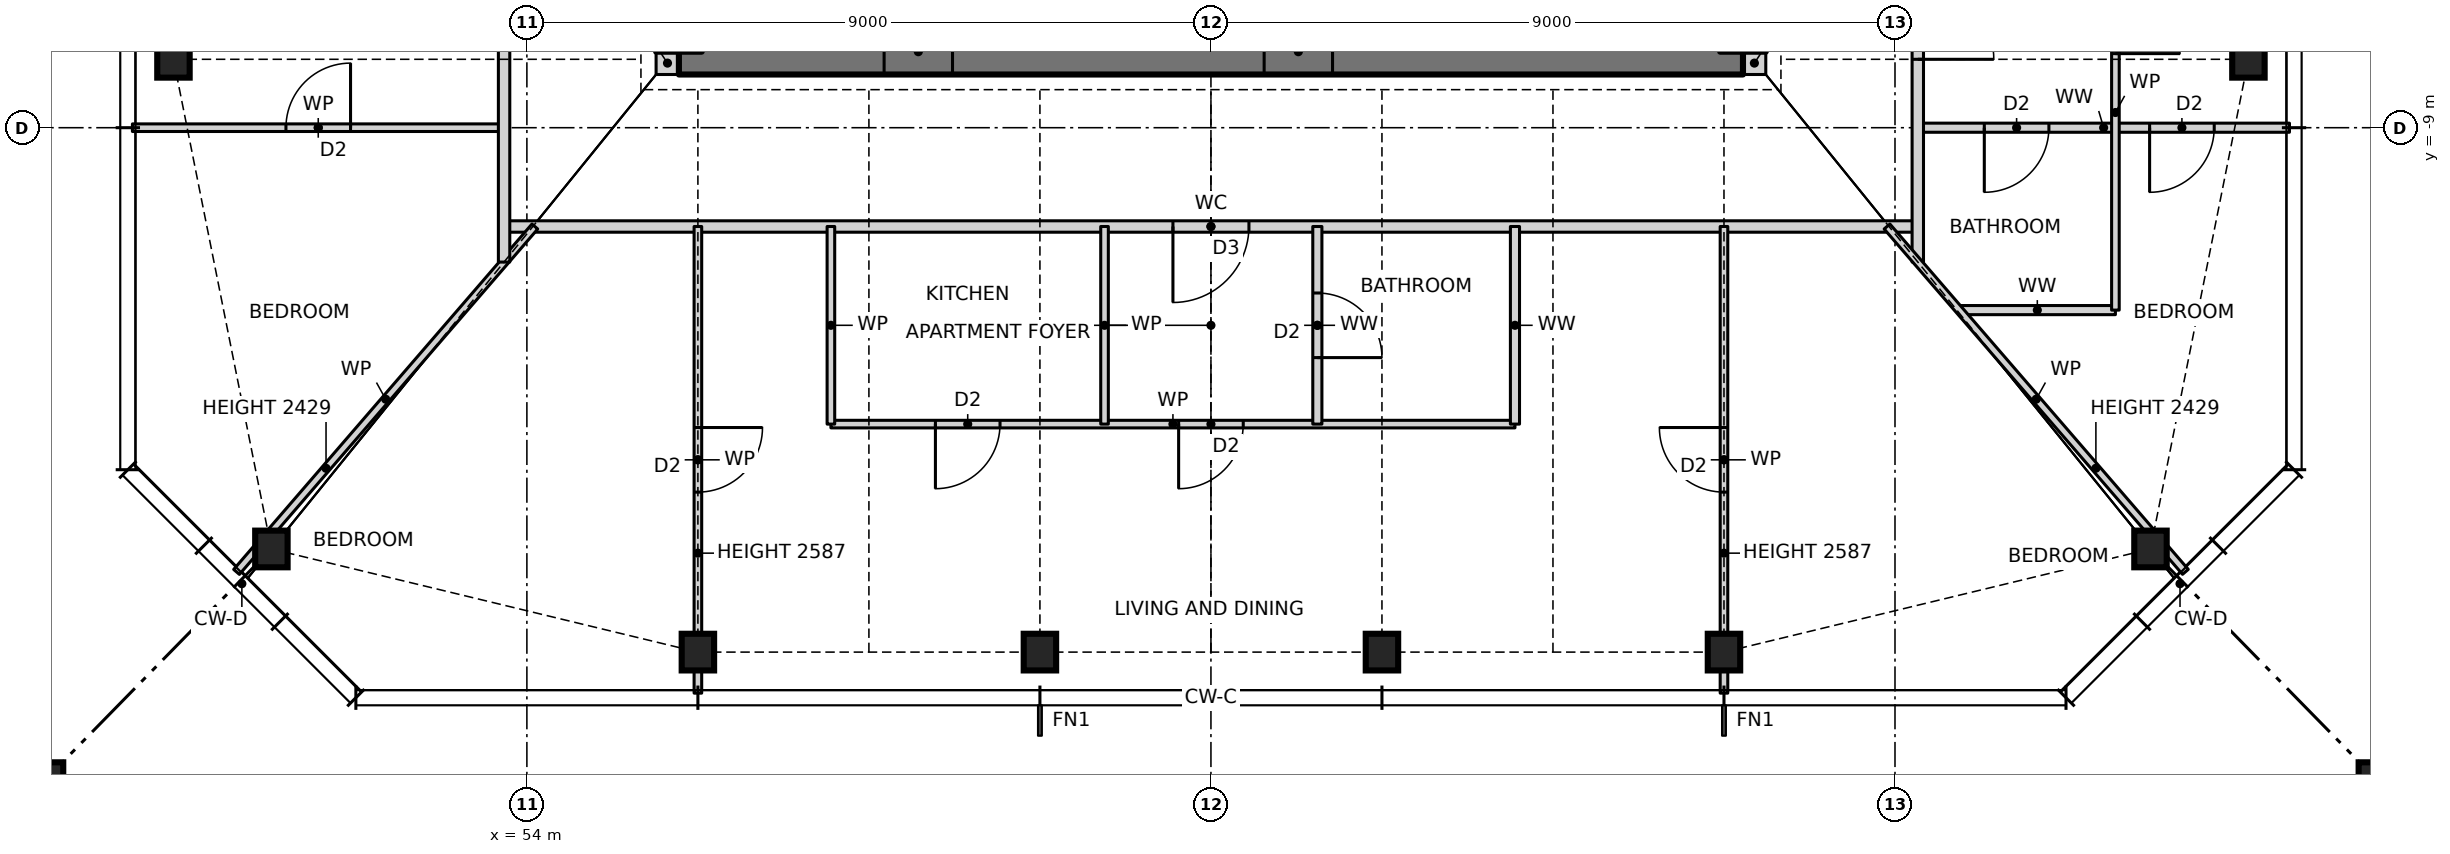
"""IFC4 building model, lengths in metres.
Left out: names, types, materials, properties, quantities, classifications, styles, units other than length and angle.
Written with IfcOpenShell. Run it as: python <this file> out.ifc"""

import sys

from ifc_helpers import new_model, si_unit, direction, frame, frame_2d, origin, origin_2d, place, context, subcontext, project, spatial, rectangle, hollow_rectangle, i_section, extrude, element, fill, save


model = new_model("IFC4")
c1 = context("Model", 3, precision=1e-05, world=origin(), true_north=direction((0.0, 1.0)))
c2 = subcontext(c1, "Body", "Model", "MODEL_VIEW")
j1 = project(units=[si_unit("LENGTHUNIT", "METRE"), si_unit("PLANEANGLEUNIT", "RADIAN")], contexts=[c1])
p1 = place(None, origin())
s1 = spatial("IfcSite", under=j1, at=p1, CompositionType="ELEMENT")
p2 = place(p1, origin())
s2 = spatial("IfcBuilding", under=s1, at=p2, CompositionType="ELEMENT")
p3 = place(p2, frame((0.0, 0.0, 91.0)))
s3 = spatial("IfcBuildingStorey", under=s2, at=p3, CompositionType="ELEMENT", Elevation=91.0)
for number, where, z_axis, x_axis in (
    (1, (50.639, -14.543, 0.0), (0.0, 0.0, 1.0), (1.0, 0.0, 0.0)),
    (2, (56.25, -15.9, 0.0), (0.0, 0.0, 1.0), (1.0, 0.0, 0.0)),
    (3, (60.75, -15.9, 0.0), (0.0, 0.0, 1.0), (1.0, 0.0, 0.0)),
    (4, (65.25, -15.9, 0.0), (0.0, 0.0, 1.0), (1.0, 0.0, 0.0)),
    (5, (69.75, -15.9, 0.0), (0.0, 0.0, 1.0), (1.0, 0.0, 0.0)),
    (6, (75.361, -14.543, 0.0), (0.0, 0.0, 1.0), (1.0, 0.0, 0.0)),
    (7, (76.65, -8.1, 0.0), (0.0, 0.0, 1.0), (1.0, 0.0, 0.0)),
    (8, (49.35, -8.1, 0.0), (0.0, 0.0, 1.0), (1.0, 0.0, 0.0)),
):
    element("IfcColumn", number, at=place(p3, frame(where, z_axis=z_axis, x_axis=x_axis)), inside=s3, PredefinedType="COLUMN", context=c2, shape_type="SweptSolid", body=[
        extrude(i_section(OverallWidth=0.427, OverallDepth=0.483, WebThickness=0.051, FlangeThickness=0.082, at=origin_2d()), origin(), (0.0, 0.0, 1.0), 3.5),
    ])
for number, where, z_axis, x_axis in (
    (9, (47.35, -17.9, 0.0), (0.0, 0.0, 1.0), (1.0, 0.0, 0.0)),
    (10, (78.65, -17.9, 0.0), (0.0, 0.0, 1.0), (1.0, 0.0, 0.0)),
):
    element("IfcColumn", number, at=place(p3, frame(where, z_axis=z_axis, x_axis=x_axis)), inside=s3, PredefinedType="COLUMN", context=c2, shape_type="SweptSolid", body=[
        extrude(hollow_rectangle(XDim=1.1, YDim=1.1, WallThickness=0.06, at=origin_2d()), origin(), (0.0, 0.0, 1.0), 3.5),
    ])
for number, where, z_axis, x_axis in (
    (11, (55.7, -8.15, 0.0), (0.0, 0.0, 1.0), (1.0, 0.0, 0.0)),
    (12, (70.0, -8.15, 0.0), (0.0, 0.0, 1.0), (1.0, 0.0, 0.0)),
):
    element("IfcWall", number, at=place(p3, frame(where, z_axis=z_axis, x_axis=x_axis)), inside=s3, PredefinedType="SOLIDWALL", context=c2, shape_type="SweptSolid", body=[
        extrude(rectangle(XDim=0.3, YDim=0.3, at=frame_2d((0.15, 0.0))), origin(), (0.0, 0.0, 1.0), 3.5),
    ])
p4 = place(p3, frame((56.0, -8.0, 0.0), z_axis=(0.0, 0.0, 1.0), x_axis=(1.0, 0.0, 0.0)))
e13 = element("IfcWall", 13, at=p4, inside=s3, PredefinedType="SHEAR", context=c2, shape_type="SweptSolid", body=[
    extrude(rectangle(XDim=14.0, YDim=0.6, at=frame_2d((7.0, 0.0))), origin(), (0.0, 0.0, 1.0), 3.5),
])
p5 = place(p4, frame((2.7, 0.0, 0.0)))
e14 = element("IfcOpeningElement", 14, at=p5, cuts=e13, PredefinedType="OPENING", context=c2, shape_type="SweptSolid", body=[
    extrude(rectangle(XDim=0.9, YDim=2.1, at=frame_2d((0.45, 1.05))), frame((0.0, 0.31, 0.0), z_axis=(0.0, -1.0, 0.0), x_axis=(1.0, 0.0, 0.0)), (0.0, 0.0, 1.0), 0.62),
])
p6 = place(p4, frame((7.7, 0.0, 0.0)))
e15 = element("IfcOpeningElement", 15, at=p6, cuts=e13, PredefinedType="OPENING", context=c2, shape_type="SweptSolid", body=[
    extrude(rectangle(XDim=0.9, YDim=2.1, at=frame_2d((0.45, 1.05))), frame((0.0, 0.31, 0.0), z_axis=(0.0, -1.0, 0.0), x_axis=(1.0, 0.0, 0.0)), (0.0, 0.0, 1.0), 0.62),
])
p7 = place(p3, frame((58.0, -12.9, 0.0), z_axis=(0.0, 0.0, 1.0), x_axis=(1.0, 0.0, 0.0)))
e16 = element("IfcWall", 16, at=p7, inside=s3, PredefinedType="PARTITIONING", context=c2, shape_type="SweptSolid", body=[
    extrude(rectangle(XDim=9.0, YDim=0.1, at=frame_2d((4.5, 0.0))), origin(), (0.0, 0.0, 1.0), 3.27),
])
p8 = place(p7, frame((1.375, 0.0, 0.0)))
e17 = element("IfcOpeningElement", 17, at=p8, cuts=e16, PredefinedType="OPENING", context=c2, shape_type="SweptSolid", body=[
    extrude(rectangle(XDim=0.85, YDim=2.1, at=frame_2d((0.425, 1.05))), frame((0.0, 0.06, 0.0), z_axis=(0.0, -1.0, 0.0), x_axis=(1.0, 0.0, 0.0)), (0.0, 0.0, 1.0), 0.12),
])
p9 = place(p7, frame((4.575, 0.0, 0.0)))
e18 = element("IfcOpeningElement", 18, at=p9, cuts=e16, PredefinedType="OPENING", context=c2, shape_type="SweptSolid", body=[
    extrude(rectangle(XDim=0.85, YDim=2.1, at=frame_2d((0.425, 1.05))), frame((0.0, 0.06, 0.0), z_axis=(0.0, -1.0, 0.0), x_axis=(1.0, 0.0, 0.0)), (0.0, 0.0, 1.0), 0.12),
])
p10 = place(p3, frame((72.845, -11.4, 0.0), z_axis=(0.0, 0.0, 1.0), x_axis=(1.0, 0.0, 0.0)))
e19 = element("IfcWall", 19, at=p10, inside=s3, PredefinedType="PARTITIONING", context=c2, shape_type="SweptSolid", body=[
    extrude(rectangle(XDim=2.055, YDim=0.12, at=frame_2d((1.027, 0.0))), origin(), (0.0, 0.0, 1.0), 3.27),
])
p11 = place(p3, frame((53.7, -10.3, 0.0), z_axis=(0.0, 0.0, 1.0), x_axis=(1.0, 0.0, 0.0)))
e20 = element("IfcWall", 20, at=p11, inside=s3, PredefinedType="PARTITIONING", context=c2, shape_type="SweptSolid", body=[
    extrude(rectangle(XDim=18.6, YDim=0.15, at=frame_2d((9.3, 0.0))), origin(), (0.0, 0.0, 1.0), 3.27),
])
p12 = place(p11, frame((8.8, 0.0, 0.0)))
e21 = element("IfcOpeningElement", 21, at=p12, cuts=e20, PredefinedType="OPENING", context=c2, shape_type="SweptSolid", body=[
    extrude(rectangle(XDim=1.0, YDim=2.1, at=frame_2d((0.5, 1.05))), frame((0.0, 0.085, 0.0), z_axis=(0.0, -1.0, 0.0), x_axis=(1.0, 0.0, 0.0)), (0.0, 0.0, 1.0), 0.17),
])
p13 = place(p3, frame((48.81, -9.0, 0.0), z_axis=(0.0, 0.0, 1.0), x_axis=(1.0, 0.0, 0.0)))
e22 = element("IfcWall", 22, at=p13, inside=s3, PredefinedType="PARTITIONING", context=c2, shape_type="SweptSolid", body=[
    extrude(rectangle(XDim=4.89, YDim=0.1, at=frame_2d((2.445, 0.0))), origin(), (0.0, 0.0, 1.0), 3.27),
])
p14 = place(p13, frame((2.02, 0.0, 0.0)))
e23 = element("IfcOpeningElement", 23, at=p14, cuts=e22, PredefinedType="OPENING", context=c2, shape_type="SweptSolid", body=[
    extrude(rectangle(XDim=0.85, YDim=2.1, at=frame_2d((0.425, 1.05))), frame((0.0, 0.06, 0.0), z_axis=(0.0, -1.0, 0.0), x_axis=(1.0, 0.0, 0.0)), (0.0, 0.0, 1.0), 0.12),
])
p15 = place(p3, frame((72.3, -9.0, 0.0), z_axis=(0.0, 0.0, 1.0), x_axis=(1.0, 0.0, 0.0)))
e24 = element("IfcWall", 24, at=p15, inside=s3, PredefinedType="PARTITIONING", context=c2, shape_type="SweptSolid", body=[
    extrude(rectangle(XDim=4.89, YDim=0.12, at=frame_2d((2.445, 0.0))), origin(), (0.0, 0.0, 1.0), 3.27),
])
p16 = place(p15, frame((0.875, 0.0, 0.0)))
e25 = element("IfcOpeningElement", 25, at=p16, cuts=e24, PredefinedType="OPENING", context=c2, shape_type="SweptSolid", body=[
    extrude(rectangle(XDim=0.85, YDim=2.1, at=frame_2d((0.425, 1.05))), frame((0.0, 0.07, 0.0), z_axis=(0.0, -1.0, 0.0), x_axis=(1.0, 0.0, 0.0)), (0.0, 0.0, 1.0), 0.14),
])
p17 = place(p15, frame((3.05, 0.0, 0.0)))
e26 = element("IfcOpeningElement", 26, at=p17, cuts=e24, PredefinedType="OPENING", context=c2, shape_type="SweptSolid", body=[
    extrude(rectangle(XDim=0.85, YDim=2.1, at=frame_2d((0.425, 1.05))), frame((0.0, 0.07, 0.0), z_axis=(0.0, -1.0, 0.0), x_axis=(1.0, 0.0, 0.0)), (0.0, 0.0, 1.0), 0.14),
])
p18 = place(p3, frame((50.18, -14.845, 0.0), z_axis=(0.0, 0.0, 1.0), x_axis=(0.653585997703, 0.756852260092, 0.0)))
e27 = element("IfcWall", 27, at=p18, inside=s3, PredefinedType="PARTITIONING", context=c2, shape_type="SweptSolid", body=[
    extrude(rectangle(XDim=6.005, YDim=0.1, at=frame_2d((3.002, 0.0))), origin(), (0.0, 0.0, 1.0), 2.429),
])
p19 = place(p3, frame((74.9, -11.4, 0.0), z_axis=(0.0, 0.0, 1.0), x_axis=(0.0, 1.0, 0.0)))
e28 = element("IfcWall", 28, at=p19, inside=s3, PredefinedType="PARTITIONING", context=c2, shape_type="SweptSolid", body=[
    extrude(rectangle(XDim=5.2, YDim=0.1, at=frame_2d((2.6, 0.0))), origin(), (0.0, 0.0, 1.0), 3.27),
])
p20 = place(p19, frame((3.375, 0.0, 0.0)))
e29 = element("IfcOpeningElement", 29, at=p20, cuts=e28, PredefinedType="OPENING", context=c2, shape_type="SweptSolid", body=[
    extrude(rectangle(XDim=0.85, YDim=2.1, at=frame_2d((0.425, 1.05))), frame((0.0, 0.06, 0.0), z_axis=(0.0, -1.0, 0.0), x_axis=(1.0, 0.0, 0.0)), (0.0, 0.0, 1.0), 0.12),
])
p21 = place(p3, frame((72.3, -10.768, 0.0), z_axis=(0.0, 0.0, 1.0), x_axis=(0.0, 1.0, 0.0)))
e30 = element("IfcWall", 30, at=p21, inside=s3, PredefinedType="PARTITIONING", context=c2, shape_type="SweptSolid", body=[
    extrude(rectangle(XDim=21.536, YDim=0.15, at=frame_2d((10.768, 0.0))), origin(), (0.0, 0.0, 1.0), 3.27),
])
p22 = place(p21, frame((2.668, 0.0, 0.0)))
e31 = element("IfcOpeningElement", 31, at=p22, cuts=e30, PredefinedType="OPENING", context=c2, shape_type="SweptSolid", body=[
    extrude(rectangle(XDim=1.0, YDim=2.1, at=frame_2d((0.5, 1.05))), frame((0.0, 0.085, 0.0), z_axis=(0.0, -1.0, 0.0), x_axis=(1.0, 0.0, 0.0)), (0.0, 0.0, 1.0), 0.17),
])
p23 = place(p21, frame((6.893, 0.0, 0.0)))
e32 = element("IfcOpeningElement", 32, at=p23, cuts=e30, PredefinedType="OPENING", context=c2, shape_type="SweptSolid", body=[
    extrude(rectangle(XDim=1.0, YDim=2.1, at=frame_2d((0.5, 1.05))), frame((0.0, 0.085, 0.0), z_axis=(0.0, -1.0, 0.0), x_axis=(1.0, 0.0, 0.0)), (0.0, 0.0, 1.0), 0.17),
])
p24 = place(p21, frame((16.168, 0.0, 0.0)))
e33 = element("IfcOpeningElement", 33, at=p24, cuts=e30, PredefinedType="OPENING", context=c2, shape_type="SweptSolid", body=[
    extrude(rectangle(XDim=1.0, YDim=2.1, at=frame_2d((0.5, 1.05))), frame((0.0, 0.085, 0.0), z_axis=(0.0, -1.0, 0.0), x_axis=(1.0, 0.0, 0.0)), (0.0, 0.0, 1.0), 0.17),
])
p25 = place(p3, frame((69.75, -16.44, 0.0), z_axis=(0.0, 0.0, 1.0), x_axis=(0.0, 1.0, 0.0)))
e34 = element("IfcWall", 34, at=p25, inside=s3, PredefinedType="PARTITIONING", context=c2, shape_type="SweptSolid", body=[
    extrude(rectangle(XDim=6.14, YDim=0.1, at=frame_2d((3.07, 0.0))), origin(), (0.0, 0.0, 1.0), 2.587),
])
p26 = place(p25, frame((2.645, 0.0, 0.0)))
e35 = element("IfcOpeningElement", 35, at=p26, cuts=e34, PredefinedType="OPENING", context=c2, shape_type="SweptSolid", body=[
    extrude(rectangle(XDim=0.85, YDim=2.1, at=frame_2d((0.425, 1.05))), frame((0.0, 0.06, 0.0), z_axis=(0.0, -1.0, 0.0), x_axis=(1.0, 0.0, 0.0)), (0.0, 0.0, 1.0), 0.12),
])
p27 = place(p3, frame((67.0, -12.9, 0.0), z_axis=(0.0, 0.0, 1.0), x_axis=(0.0, 1.0, 0.0)))
e36 = element("IfcWall", 36, at=p27, inside=s3, PredefinedType="PARTITIONING", context=c2, shape_type="SweptSolid", body=[
    extrude(rectangle(XDim=2.6, YDim=0.12, at=frame_2d((1.3, 0.0))), origin(), (0.0, 0.0, 1.0), 3.27),
])
p28 = place(p3, frame((64.4, -12.9, 0.0), z_axis=(0.0, 0.0, 1.0), x_axis=(0.0, 1.0, 0.0)))
e37 = element("IfcWall", 37, at=p28, inside=s3, PredefinedType="PARTITIONING", context=c2, shape_type="SweptSolid", body=[
    extrude(rectangle(XDim=2.6, YDim=0.12, at=frame_2d((1.3, 0.0))), origin(), (0.0, 0.0, 1.0), 3.27),
])
p29 = place(p28, frame((0.875, 0.0, 0.0)))
e38 = element("IfcOpeningElement", 38, at=p29, cuts=e37, PredefinedType="OPENING", context=c2, shape_type="SweptSolid", body=[
    extrude(rectangle(XDim=0.85, YDim=2.1, at=frame_2d((0.425, 1.05))), frame((0.0, 0.07, 0.0), z_axis=(0.0, -1.0, 0.0), x_axis=(1.0, 0.0, 0.0)), (0.0, 0.0, 1.0), 0.14),
])
for number, where, z_axis, x_axis in (
    (39, (61.6, -12.9, 0.0), (0.0, 0.0, 1.0), (0.0, 1.0, 0.0)),
    (40, (58.0, -12.9, 0.0), (0.0, 0.0, 1.0), (0.0, 1.0, 0.0)),
):
    element("IfcWall", number, at=place(p3, frame(where, z_axis=z_axis, x_axis=x_axis)), inside=s3, PredefinedType="PARTITIONING", context=c2, shape_type="SweptSolid", body=[
        extrude(rectangle(XDim=2.6, YDim=0.1, at=frame_2d((1.3, 0.0))), origin(), (0.0, 0.0, 1.0), 3.27),
    ])
p30 = place(p3, frame((56.25, -16.44, 0.0), z_axis=(0.0, 0.0, 1.0), x_axis=(0.0, 1.0, 0.0)))
e41 = element("IfcWall", 41, at=p30, inside=s3, PredefinedType="PARTITIONING", context=c2, shape_type="SweptSolid", body=[
    extrude(rectangle(XDim=6.14, YDim=0.1, at=frame_2d((3.07, 0.0))), origin(), (0.0, 0.0, 1.0), 2.587),
])
p31 = place(p30, frame((2.645, 0.0, 0.0)))
e42 = element("IfcOpeningElement", 42, at=p31, cuts=e41, PredefinedType="OPENING", context=c2, shape_type="SweptSolid", body=[
    extrude(rectangle(XDim=0.85, YDim=2.1, at=frame_2d((0.425, 1.05))), frame((0.0, 0.06, 0.0), z_axis=(0.0, -1.0, 0.0), x_axis=(1.0, 0.0, 0.0)), (0.0, 0.0, 1.0), 0.12),
])
p32 = place(p3, frame((53.7, -10.768, 0.0), z_axis=(0.0, 0.0, 1.0), x_axis=(0.0, 1.0, 0.0)))
e43 = element("IfcWall", 43, at=p32, inside=s3, PredefinedType="PARTITIONING", context=c2, shape_type="SweptSolid", body=[
    extrude(rectangle(XDim=21.536, YDim=0.15, at=frame_2d((10.768, 0.0))), origin(), (0.0, 0.0, 1.0), 3.27),
])
p33 = place(p32, frame((10.268, 0.0, 0.0)))
e44 = element("IfcOpeningElement", 44, at=p33, cuts=e43, PredefinedType="OPENING", context=c2, shape_type="SweptSolid", body=[
    extrude(rectangle(XDim=1.0, YDim=2.1, at=frame_2d((0.5, 1.05))), frame((0.0, 0.085, 0.0), z_axis=(0.0, -1.0, 0.0), x_axis=(1.0, 0.0, 0.0)), (0.0, 0.0, 1.0), 0.17),
])
p34 = place(p3, frame((75.821, -14.844, 0.0), z_axis=(0.0, 0.0, 1.0), x_axis=(-0.65378286253, 0.756682211144, 0.0)))
e45 = element("IfcWall", 45, at=p34, inside=s3, PredefinedType="PARTITIONING", context=c2, shape_type="SweptSolid", body=[
    extrude(rectangle(XDim=6.005, YDim=0.1, at=frame_2d((3.002, 0.0))), origin(), (0.0, 0.0, 1.0), 2.429),
])
p35 = place(p8, frame((0.85, 0.0, 0.0), z_axis=(0.0, 0.0, 1.0), x_axis=(-1.0, 0.0, 0.0)))
e46 = element("IfcDoor", 46, at=p35, inside=s3, OperationType="SINGLE_SWING_RIGHT", PredefinedType="DOOR", context=c2, shape_type="SweptSolid", body=[
    extrude(rectangle(XDim=0.85, YDim=2.1, at=frame_2d((0.425, 1.05))), frame((0.0, 0.025, 0.0), z_axis=(0.0, -1.0, 0.0), x_axis=(1.0, 0.0, 0.0)), (0.0, 0.0, 1.0), 0.05),
])
fill(e17, e46)
p36 = place(p12, frame((1.0, 0.0, 0.0), z_axis=(0.0, 0.0, 1.0), x_axis=(-1.0, 0.0, 0.0)))
e47 = element("IfcDoor", 47, at=p36, inside=s3, OperationType="SINGLE_SWING_RIGHT", PredefinedType="DOOR", context=c2, shape_type="SweptSolid", body=[
    extrude(rectangle(XDim=1.0, YDim=2.1, at=frame_2d((0.5, 1.05))), frame((0.0, 0.025, 0.0), z_axis=(0.0, -1.0, 0.0), x_axis=(1.0, 0.0, 0.0)), (0.0, 0.0, 1.0), 0.05),
])
fill(e21, e47)
p37 = place(p9, frame((0.85, 0.0, 0.0), z_axis=(0.0, 0.0, 1.0), x_axis=(-1.0, 0.0, 0.0)))
e48 = element("IfcDoor", 48, at=p37, inside=s3, OperationType="SINGLE_SWING_RIGHT", PredefinedType="DOOR", context=c2, shape_type="SweptSolid", body=[
    extrude(rectangle(XDim=0.85, YDim=2.1, at=frame_2d((0.425, 1.05))), frame((0.0, 0.025, 0.0), z_axis=(0.0, -1.0, 0.0), x_axis=(1.0, 0.0, 0.0)), (0.0, 0.0, 1.0), 0.05),
])
fill(e18, e48)
p38 = place(p29, frame((0.85, 0.0, 0.0), z_axis=(0.0, 0.0, 1.0), x_axis=(-1.0, 0.0, 0.0)))
e49 = element("IfcDoor", 49, at=p38, inside=s3, OperationType="SINGLE_SWING_RIGHT", PredefinedType="DOOR", context=c2, shape_type="SweptSolid", body=[
    extrude(rectangle(XDim=0.85, YDim=2.1, at=frame_2d((0.425, 1.05))), frame((0.0, 0.025, 0.0), z_axis=(0.0, -1.0, 0.0), x_axis=(1.0, 0.0, 0.0)), (0.0, 0.0, 1.0), 0.05),
])
fill(e38, e49)
p39 = place(p31, frame((0.85, 0.0, 0.0), z_axis=(0.0, 0.0, 1.0), x_axis=(-1.0, 0.0, 0.0)))
e50 = element("IfcDoor", 50, at=p39, inside=s3, OperationType="SINGLE_SWING_LEFT", PredefinedType="DOOR", context=c2, shape_type="SweptSolid", body=[
    extrude(rectangle(XDim=0.85, YDim=2.1, at=frame_2d((0.425, 1.05))), frame((0.0, 0.025, 0.0), z_axis=(0.0, -1.0, 0.0), x_axis=(1.0, 0.0, 0.0)), (0.0, 0.0, 1.0), 0.05),
])
fill(e42, e50)
p40 = place(p26, origin())
e51 = element("IfcDoor", 51, at=p40, inside=s3, OperationType="SINGLE_SWING_RIGHT", PredefinedType="DOOR", context=c2, shape_type="SweptSolid", body=[
    extrude(rectangle(XDim=0.85, YDim=2.1, at=frame_2d((0.425, 1.05))), frame((0.0, 0.025, 0.0), z_axis=(0.0, -1.0, 0.0), x_axis=(1.0, 0.0, 0.0)), (0.0, 0.0, 1.0), 0.05),
])
fill(e35, e51)
p41 = place(p22, frame((1.0, 0.0, 0.0), z_axis=(0.0, 0.0, 1.0), x_axis=(-1.0, 0.0, 0.0)))
e52 = element("IfcDoor", 52, at=p41, inside=s3, OperationType="SINGLE_SWING_RIGHT", PredefinedType="DOOR", context=c2, shape_type="SweptSolid", body=[
    extrude(rectangle(XDim=1.0, YDim=2.1, at=frame_2d((0.5, 1.05))), frame((0.0, 0.025, 0.0), z_axis=(0.0, -1.0, 0.0), x_axis=(1.0, 0.0, 0.0)), (0.0, 0.0, 1.0), 0.05),
])
fill(e31, e52)
p42 = place(p20, frame((0.85, 0.0, 0.0), z_axis=(0.0, 0.0, 1.0), x_axis=(-1.0, 0.0, 0.0)))
e53 = element("IfcDoor", 53, at=p42, inside=s3, OperationType="SINGLE_SWING_RIGHT", PredefinedType="DOOR", context=c2, shape_type="SweptSolid", body=[
    extrude(rectangle(XDim=0.85, YDim=2.1, at=frame_2d((0.425, 1.05))), frame((0.0, 0.025, 0.0), z_axis=(0.0, -1.0, 0.0), x_axis=(1.0, 0.0, 0.0)), (0.0, 0.0, 1.0), 0.05),
])
fill(e29, e53)
p43 = place(p16, frame((0.85, 0.0, 0.0), z_axis=(0.0, 0.0, 1.0), x_axis=(-1.0, 0.0, 0.0)))
e54 = element("IfcDoor", 54, at=p43, inside=s3, OperationType="SINGLE_SWING_RIGHT", PredefinedType="DOOR", context=c2, shape_type="SweptSolid", body=[
    extrude(rectangle(XDim=0.85, YDim=2.1, at=frame_2d((0.425, 1.05))), frame((0.0, 0.025, 0.0), z_axis=(0.0, -1.0, 0.0), x_axis=(1.0, 0.0, 0.0)), (0.0, 0.0, 1.0), 0.05),
])
fill(e25, e54)
p44 = place(p17, frame((0.85, 0.0, 0.0), z_axis=(0.0, 0.0, 1.0), x_axis=(-1.0, 0.0, 0.0)))
e55 = element("IfcDoor", 55, at=p44, inside=s3, OperationType="SINGLE_SWING_RIGHT", PredefinedType="DOOR", context=c2, shape_type="SweptSolid", body=[
    extrude(rectangle(XDim=0.85, YDim=2.1, at=frame_2d((0.425, 1.05))), frame((0.0, 0.025, 0.0), z_axis=(0.0, -1.0, 0.0), x_axis=(1.0, 0.0, 0.0)), (0.0, 0.0, 1.0), 0.05),
])
fill(e26, e55)
p45 = place(p14, origin())
e56 = element("IfcDoor", 56, at=p45, inside=s3, OperationType="SINGLE_SWING_RIGHT", PredefinedType="DOOR", context=c2, shape_type="SweptSolid", body=[
    extrude(rectangle(XDim=0.85, YDim=2.1, at=frame_2d((0.425, 1.05))), frame((0.0, 0.025, 0.0), z_axis=(0.0, -1.0, 0.0), x_axis=(1.0, 0.0, 0.0)), (0.0, 0.0, 1.0), 0.05),
])
fill(e23, e56)
p46 = place(p5, origin())
e57 = element("IfcDoor", 57, at=p46, inside=s3, OperationType="SINGLE_SWING_LEFT", PredefinedType="DOOR", context=c2, shape_type="SweptSolid", body=[
    extrude(rectangle(XDim=0.9, YDim=2.1, at=frame_2d((0.45, 1.05))), frame((0.0, 0.025, 0.0), z_axis=(0.0, -1.0, 0.0), x_axis=(1.0, 0.0, 0.0)), (0.0, 0.0, 1.0), 0.05),
])
fill(e14, e57)
p47 = place(p6, origin())
e58 = element("IfcDoor", 58, at=p47, inside=s3, OperationType="SINGLE_SWING_LEFT", PredefinedType="DOOR", context=c2, shape_type="SweptSolid", body=[
    extrude(rectangle(XDim=0.9, YDim=2.1, at=frame_2d((0.45, 1.05))), frame((0.0, 0.025, 0.0), z_axis=(0.0, -1.0, 0.0), x_axis=(1.0, 0.0, 0.0)), (0.0, 0.0, 1.0), 0.05),
])
fill(e15, e58)
save(model, sys.argv[1])
